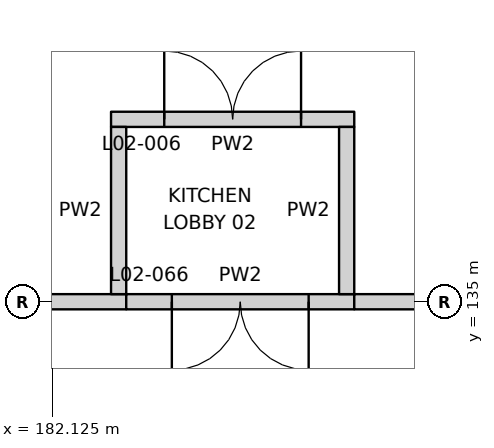
"""IFC4 building model, lengths in metres.
Left out: names, types, materials, properties, quantities, classifications, styles, units other than length and angle.
Written with IfcOpenShell. Run it as: python <this file> out.ifc"""

import sys

from ifc_helpers import new_model, si_unit, direction, frame, frame_2d, origin, place, context, subcontext, project, spatial, rectangle, extrude, element, fill, save


model = new_model("IFC4")
c1 = context("Model", 3, precision=1e-05, world=origin(), true_north=direction((0.0, 1.0)))
c2 = subcontext(c1, "Body", "Model", "MODEL_VIEW")
j1 = project(units=[si_unit("LENGTHUNIT", "METRE"), si_unit("PLANEANGLEUNIT", "RADIAN")], contexts=[c1])
p1 = place(None, origin())
s1 = spatial("IfcSite", under=j1, at=p1, CompositionType="ELEMENT")
p2 = place(p1, origin())
s2 = spatial("IfcBuilding", under=s1, at=p2, CompositionType="ELEMENT")
p3 = place(p2, frame((0.0, 0.0, 11.5)))
s3 = spatial("IfcBuildingStorey", under=s2, at=p3, CompositionType="ELEMENT", Elevation=11.5)
p4 = place(p3, frame((180.3, 135.0, 0.0), z_axis=(0.0, 0.0, 1.0), x_axis=(1.0, 0.0, 0.0)))
e1 = element("IfcWall", 1, at=p4, inside=s3, PredefinedType="PARTITIONING", context=c2, shape_type="SweptSolid", body=[
    extrude(rectangle(XDim=2.8, YDim=0.2, at=frame_2d((1.4, 0.0))), origin(), (0.0, 0.0, 1.0), 9.15),
])
p5 = place(p3, frame((183.1, 135.0, 0.0), z_axis=(0.0, 0.0, 1.0), x_axis=(1.0, 0.0, 0.0)))
e2 = element("IfcWall", 2, at=p5, inside=s3, PredefinedType="PARTITIONING", context=c2, shape_type="SweptSolid", body=[
    extrude(rectangle(XDim=3.0, YDim=0.2, at=frame_2d((1.5, 0.0))), origin(), (0.0, 0.0, 1.0), 9.15),
])
p6 = place(p5, frame((0.6, 0.0, 0.0)))
e3 = element("IfcOpeningElement", 3, at=p6, cuts=e2, PredefinedType="OPENING", context=c2, shape_type="SweptSolid", body=[
    extrude(rectangle(XDim=1.8, YDim=2.1, at=frame_2d((0.9, 1.05))), frame((0.0, 0.11, 0.0), z_axis=(0.0, -1.0, 0.0), x_axis=(1.0, 0.0, 0.0)), (0.0, 0.0, 1.0), 0.22),
])
p7 = place(p3, frame((186.1, 135.0, 0.0), z_axis=(0.0, 0.0, 1.0), x_axis=(1.0, 0.0, 0.0)))
e4 = element("IfcWall", 4, at=p7, inside=s3, PredefinedType="PARTITIONING", context=c2, shape_type="SweptSolid", body=[
    extrude(rectangle(XDim=2.9, YDim=0.2, at=frame_2d((1.45, 0.0))), origin(), (0.0, 0.0, 1.0), 9.15),
])
p8 = place(p3, frame((182.9, 137.4, 0.0), z_axis=(0.0, 0.0, 1.0), x_axis=(1.0, 0.0, 0.0)))
e5 = element("IfcWall", 5, at=p8, inside=s3, PredefinedType="PARTITIONING", context=c2, shape_type="SweptSolid", body=[
    extrude(rectangle(XDim=3.2, YDim=0.2, at=frame_2d((1.6, 0.0))), origin(), (0.0, 0.0, 1.0), 10.5),
])
p9 = place(p8, frame((0.7, 0.0, 0.0)))
e6 = element("IfcOpeningElement", 6, at=p9, cuts=e5, PredefinedType="OPENING", context=c2, shape_type="SweptSolid", body=[
    extrude(rectangle(XDim=1.8, YDim=2.1, at=frame_2d((0.9, 1.05))), frame((0.0, 0.11, 0.0), z_axis=(0.0, -1.0, 0.0), x_axis=(1.0, 0.0, 0.0)), (0.0, 0.0, 1.0), 0.22),
])
for number, where, z_axis, x_axis in (
    (7, (183.0, 135.1, 0.0), (0.0, 0.0, 1.0), (0.0, 1.0, 0.0)),
    (8, (186.0, 135.1, 0.0), (0.0, 0.0, 1.0), (0.0, 1.0, 0.0)),
):
    element("IfcWall", number, at=place(p3, frame(where, z_axis=z_axis, x_axis=x_axis)), inside=s3, PredefinedType="PARTITIONING", context=c2, shape_type="SweptSolid", body=[
        extrude(rectangle(XDim=2.2, YDim=0.2, at=frame_2d((1.1, 0.0))), origin(), (0.0, 0.0, 1.0), 10.5),
    ])
p10 = place(p9, origin())
e9 = element("IfcDoor", 9, at=p10, inside=s3, OperationType="DOUBLE_DOOR_DOUBLE_SWING", PredefinedType="DOOR", context=c2, shape_type="SweptSolid", body=[
    extrude(rectangle(XDim=1.8, YDim=2.1, at=frame_2d((0.9, 1.05))), frame((0.0, 0.025, 0.0), z_axis=(0.0, -1.0, 0.0), x_axis=(1.0, 0.0, 0.0)), (0.0, 0.0, 1.0), 0.05),
])
fill(e6, e9)
p11 = place(p6, frame((1.8, 0.0, 0.0), z_axis=(0.0, 0.0, 1.0), x_axis=(-1.0, 0.0, 0.0)))
e10 = element("IfcDoor", 10, at=p11, inside=s3, OperationType="DOUBLE_DOOR_DOUBLE_SWING", PredefinedType="DOOR", context=c2, shape_type="SweptSolid", body=[
    extrude(rectangle(XDim=1.8, YDim=2.1, at=frame_2d((0.9, 1.05))), frame((0.0, 0.025, 0.0), z_axis=(0.0, -1.0, 0.0), x_axis=(1.0, 0.0, 0.0)), (0.0, 0.0, 1.0), 0.05),
])
fill(e3, e10)
save(model, sys.argv[1])
